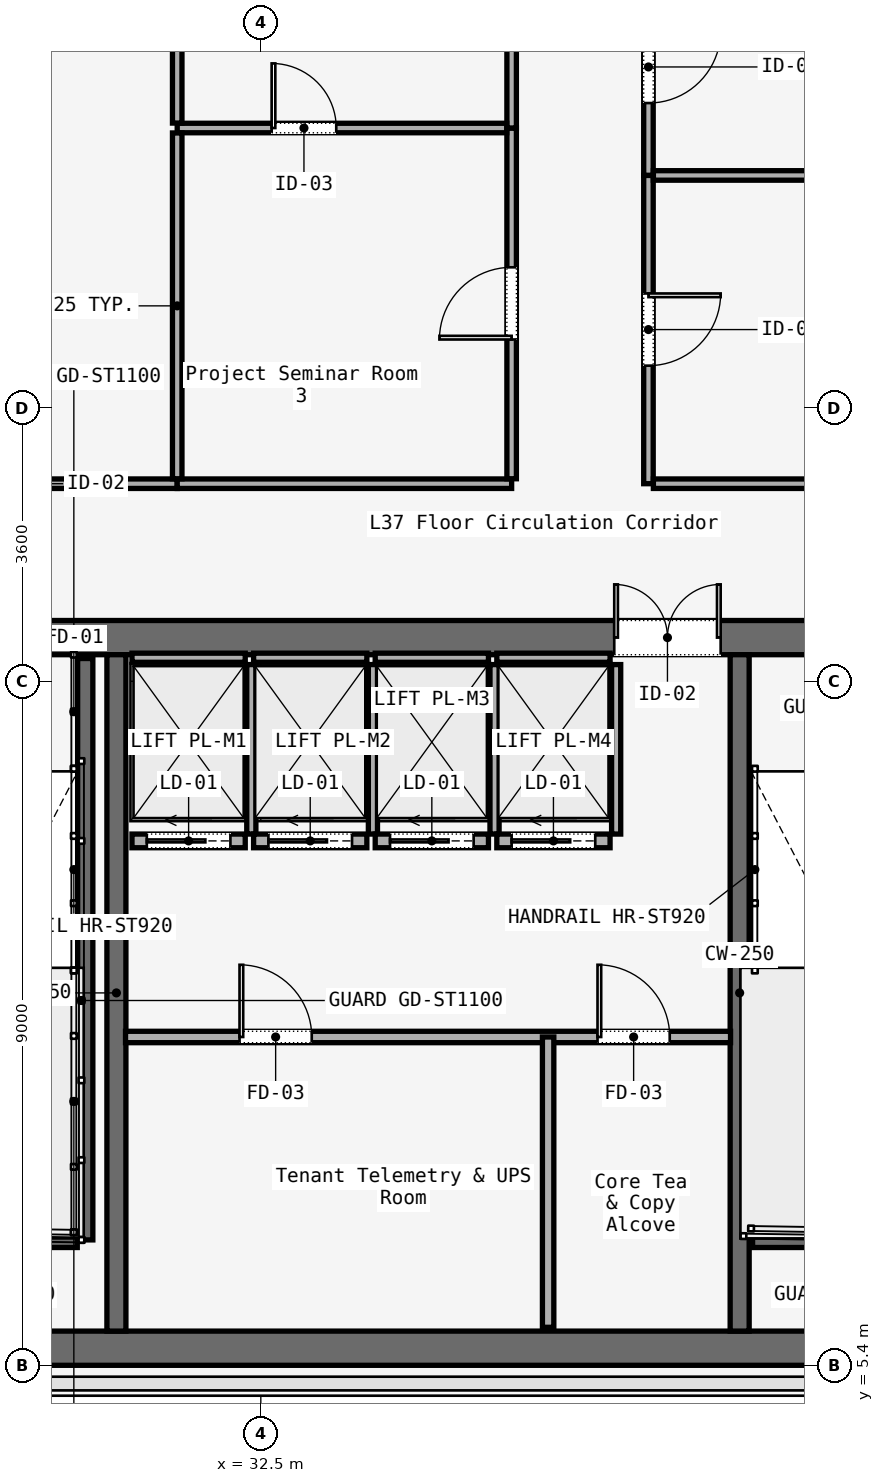
"""IFC4 building model, lengths in metres.
Left out: names, types, materials, properties, quantities, classifications, styles, units other than length and angle.
Written with IfcOpenShell. Run it as: python <this file> out.ifc"""

import sys

from ifc_helpers import new_model, si_unit, direction, frame, frame_2d, origin, place, context, subcontext, project, spatial, rectangle, extrude, element, fill, save


model = new_model("IFC4")
c1 = context("Model", 3, precision=1e-05, world=origin(), true_north=direction((0.0, 1.0)))
c2 = subcontext(c1, "Body", "Model", "MODEL_VIEW")
j1 = project(units=[si_unit("LENGTHUNIT", "METRE"), si_unit("PLANEANGLEUNIT", "RADIAN")], contexts=[c1])
p1 = place(None, origin())
s1 = spatial("IfcSite", under=j1, at=p1, CompositionType="ELEMENT")
p2 = place(p1, origin())
s2 = spatial("IfcBuilding", under=s1, at=p2, CompositionType="ELEMENT")
p3 = place(p2, frame((0.0, 0.0, 157.4)))
s3 = spatial("IfcBuildingStorey", under=s2, at=p3, CompositionType="ELEMENT", Elevation=157.4)
p4 = place(p3, frame((26.45, 14.975, 0.0), z_axis=(0.0, 0.0, 1.0), x_axis=(1.0, 0.0, 0.0)))
e1 = element("IfcWall", 1, at=p4, inside=s3, PredefinedType="SOLIDWALL", context=c2, shape_type="SweptSolid", body=[
    extrude(rectangle(XDim=31.1, YDim=0.45, at=frame_2d((15.55, 0.0))), origin(), (0.0, 0.0, 1.0), 3.58),
])
p5 = place(p4, frame((1.65, 0.0, 0.0)))
e2 = element("IfcOpeningElement", 2, at=p5, cuts=e1, PredefinedType="OPENING", context=c2, shape_type="SweptSolid", body=[
    extrude(rectangle(XDim=1.1, YDim=2.2, at=frame_2d((0.55, 1.1))), frame((0.0, 0.225, 0.0), z_axis=(0.0, -1.0, 0.0), x_axis=(1.0, 0.0, 0.0)), (0.0, 0.0, 1.0), 0.45),
])
p6 = place(p4, frame((13.65, 0.0, 0.0)))
e3 = element("IfcOpeningElement", 3, at=p6, cuts=e1, PredefinedType="OPENING", context=c2, shape_type="SweptSolid", body=[
    extrude(rectangle(XDim=1.1, YDim=2.2, at=frame_2d((0.55, 1.1))), frame((0.0, 0.225, 0.0), z_axis=(0.0, -1.0, 0.0), x_axis=(1.0, 0.0, 0.0)), (0.0, 0.0, 1.0), 0.45),
])
p7 = place(p4, frame((25.55, 0.0, 0.0)))
e4 = element("IfcOpeningElement", 4, at=p7, cuts=e1, PredefinedType="OPENING", context=c2, shape_type="SweptSolid", body=[
    extrude(rectangle(XDim=1.1, YDim=2.2, at=frame_2d((0.55, 1.1))), frame((0.0, 0.225, 0.0), z_axis=(0.0, -1.0, 0.0), x_axis=(1.0, 0.0, 0.0)), (0.0, 0.0, 1.0), 0.45),
])
p8 = place(p4, frame((10.7, 0.0, 0.0)))
e5 = element("IfcOpeningElement", 5, at=p8, cuts=e1, PredefinedType="OPENING", context=c2, shape_type="SweptSolid", body=[
    extrude(rectangle(XDim=1.4, YDim=2.2, at=frame_2d((0.7, 1.1))), frame((0.0, 0.225, 0.0), z_axis=(0.0, -1.0, 0.0), x_axis=(1.0, 0.0, 0.0)), (0.0, 0.0, 1.0), 0.45),
])
p9 = place(p4, frame((19.35, 0.0, 0.0)))
e6 = element("IfcOpeningElement", 6, at=p9, cuts=e1, PredefinedType="OPENING", context=c2, shape_type="SweptSolid", body=[
    extrude(rectangle(XDim=1.1, YDim=2.2, at=frame_2d((0.55, 1.1))), frame((0.0, 0.225, 0.0), z_axis=(0.0, -1.0, 0.0), x_axis=(1.0, 0.0, 0.0)), (0.0, 0.0, 1.0), 0.45),
])
p10 = place(p4, frame((21.4, 0.0, 0.0)))
e7 = element("IfcOpeningElement", 7, at=p10, cuts=e1, PredefinedType="OPENING", context=c2, shape_type="SweptSolid", body=[
    extrude(rectangle(XDim=0.9, YDim=2.1, at=frame_2d((0.45, 1.05))), frame((0.0, 0.225, 0.0), z_axis=(0.0, -1.0, 0.0), x_axis=(1.0, 0.0, 0.0)), (0.0, 0.0, 1.0), 0.45),
])
p11 = place(p4, frame((23.35, 0.0, 0.0)))
e8 = element("IfcOpeningElement", 8, at=p11, cuts=e1, PredefinedType="OPENING", context=c2, shape_type="SweptSolid", body=[
    extrude(rectangle(XDim=1.3, YDim=2.3, at=frame_2d((0.65, 1.15))), frame((0.0, 0.225, 0.0), z_axis=(0.0, -1.0, 0.0), x_axis=(1.0, 0.0, 0.0)), (0.0, 0.0, 1.0), 0.45),
])
p12 = place(p3, frame((26.45, 5.625, 0.0), z_axis=(0.0, 0.0, 1.0), x_axis=(1.0, 0.0, 0.0)))
e9 = element("IfcWall", 9, at=p12, inside=s3, PredefinedType="SOLIDWALL", context=c2, shape_type="SweptSolid", body=[
    extrude(rectangle(XDim=31.1, YDim=0.45, at=frame_2d((15.55, 0.0))), origin(), (0.0, 0.0, 1.0), 3.58),
])
for number, where, z_axis, x_axis in (
    (10, (30.6, 5.85, 0.0), (0.0, 0.0, 1.0), (0.0, 1.0, 0.0)),
    (11, (38.8, 5.85, 0.0), (0.0, 0.0, 1.0), (0.0, 1.0, 0.0)),
):
    element("IfcWall", number, at=place(p3, frame(where, z_axis=z_axis, x_axis=x_axis)), inside=s3, PredefinedType="SOLIDWALL", context=c2, shape_type="SweptSolid", body=[
        extrude(rectangle(XDim=8.9, YDim=0.25, at=frame_2d((4.45, 0.0))), origin(), (0.0, 0.0, 1.0), 3.58),
    ])
p13 = place(p3, frame((30.19, 14.7, 0.0), z_axis=(0.0, 0.0, 1.0), x_axis=(0.0, -1.0, 0.0)))
e12 = element("IfcWall", 12, at=p13, inside=s3, PredefinedType="SOLIDWALL", context=c2, shape_type="SweptSolid", body=[
    extrude(rectangle(XDim=7.65, YDim=0.2, at=frame_2d((3.825, 0.0))), origin(), (0.0, 0.0, 1.0), 3.8),
])
for number, where, z_axis, x_axis in (
    (13, (26.97, 7.05, 0.0), (0.0, 0.0, 1.0), (1.0, 0.0, 0.0)),
    (14, (38.97, 7.05, 0.0), (0.0, 0.0, 1.0), (1.0, 0.0, 0.0)),
):
    element("IfcWall", number, at=place(p3, frame(where, z_axis=z_axis, x_axis=x_axis)), inside=s3, PredefinedType="SOLIDWALL", context=c2, shape_type="SweptSolid", body=[
        extrude(rectangle(XDim=3.115, YDim=0.2, at=frame_2d((1.558, 0.0))), origin(), (0.0, 0.0, 1.0), 3.8),
    ])
p14 = place(p3, frame((30.72, 9.72, 0.0), z_axis=(0.0, 0.0, 1.0), x_axis=(1.0, 0.0, 0.0)))
e15 = element("IfcWall", 15, at=p14, inside=s3, PredefinedType="PARTITIONING", context=c2, shape_type="SweptSolid", body=[
    extrude(rectangle(XDim=7.96, YDim=0.15, at=frame_2d((3.98, 0.0))), origin(), (0.0, 0.0, 1.0), 3.01),
])
p15 = place(p14, frame((1.5, 0.0, 0.0)))
e16 = element("IfcOpeningElement", 16, at=p15, cuts=e15, PredefinedType="OPENING", context=c2, shape_type="SweptSolid", body=[
    extrude(rectangle(XDim=0.95, YDim=2.2, at=frame_2d((0.475, 1.1))), frame((0.0, 0.075, 0.0), z_axis=(0.0, -1.0, 0.0), x_axis=(1.0, 0.0, 0.0)), (0.0, 0.0, 1.0), 0.15),
])
p16 = place(p14, frame((6.21, 0.0, 0.0)))
e17 = element("IfcOpeningElement", 17, at=p16, cuts=e15, PredefinedType="OPENING", context=c2, shape_type="SweptSolid", body=[
    extrude(rectangle(XDim=0.95, YDim=2.2, at=frame_2d((0.475, 1.1))), frame((0.0, 0.075, 0.0), z_axis=(0.0, -1.0, 0.0), x_axis=(1.0, 0.0, 0.0)), (0.0, 0.0, 1.0), 0.15),
])
p17 = place(p3, frame((36.28, 5.9, 0.0), z_axis=(0.0, 0.0, 1.0), x_axis=(0.0, 1.0, 0.0)))
e18 = element("IfcWall", 18, at=p17, inside=s3, PredefinedType="PARTITIONING", context=c2, shape_type="SweptSolid", body=[
    extrude(rectangle(XDim=3.82, YDim=0.15, at=frame_2d((1.91, 0.0))), origin(), (0.0, 0.0, 1.0), 3.01),
])
p18 = place(p3, frame((30.805, 12.3, 0.0), z_axis=(0.0, 0.0, 1.0), x_axis=(1.0, 0.0, 0.0)))
e19 = element("IfcWall", 19, at=p18, inside=s3, PredefinedType="SOLIDWALL", context=c2, shape_type="SweptSolid", body=[
    extrude(rectangle(XDim=1.49, YDim=0.18, at=frame_2d((0.745, 0.0))), origin(), (0.0, 0.0, 1.0), 3.01),
])
p19 = place(p18, frame((0.195, 0.0, 0.0)))
e20 = element("IfcOpeningElement", 20, at=p19, cuts=e19, PredefinedType="OPENING", context=c2, shape_type="SweptSolid", body=[
    extrude(rectangle(XDim=1.1, YDim=2.2, at=frame_2d((0.55, 1.1))), frame((0.0, 0.09, 0.0), z_axis=(0.0, -1.0, 0.0), x_axis=(1.0, 0.0, 0.0)), (0.0, 0.0, 1.0), 0.18),
])
p20 = place(p3, frame((30.805, 14.71, 0.0), z_axis=(0.0, 0.0, 1.0), x_axis=(1.0, 0.0, 0.0)))
e21 = element("IfcWall", 21, at=p20, inside=s3, PredefinedType="SOLIDWALL", context=c2, shape_type="SweptSolid", body=[
    extrude(rectangle(XDim=1.49, YDim=0.12, at=frame_2d((0.745, 0.0))), origin(), (0.0, 0.0, 1.0), 3.01),
])
p21 = place(p3, frame((32.375, 12.39, 0.0), z_axis=(0.0, 0.0, 1.0), x_axis=(0.0, 1.0, 0.0)))
e22 = element("IfcWall", 22, at=p21, inside=s3, PredefinedType="SOLIDWALL", context=c2, shape_type="SweptSolid", body=[
    extrude(rectangle(XDim=2.23, YDim=0.12, at=frame_2d((1.115, 0.0))), origin(), (0.0, 0.0, 1.0), 3.01),
])
p22 = place(p3, frame((32.405, 12.3, 0.0), z_axis=(0.0, 0.0, 1.0), x_axis=(1.0, 0.0, 0.0)))
e23 = element("IfcWall", 23, at=p22, inside=s3, PredefinedType="SOLIDWALL", context=c2, shape_type="SweptSolid", body=[
    extrude(rectangle(XDim=1.49, YDim=0.18, at=frame_2d((0.745, 0.0))), origin(), (0.0, 0.0, 1.0), 3.01),
])
p23 = place(p22, frame((0.195, 0.0, 0.0)))
e24 = element("IfcOpeningElement", 24, at=p23, cuts=e23, PredefinedType="OPENING", context=c2, shape_type="SweptSolid", body=[
    extrude(rectangle(XDim=1.1, YDim=2.2, at=frame_2d((0.55, 1.1))), frame((0.0, 0.09, 0.0), z_axis=(0.0, -1.0, 0.0), x_axis=(1.0, 0.0, 0.0)), (0.0, 0.0, 1.0), 0.18),
])
p24 = place(p3, frame((32.405, 14.71, 0.0), z_axis=(0.0, 0.0, 1.0), x_axis=(1.0, 0.0, 0.0)))
e25 = element("IfcWall", 25, at=p24, inside=s3, PredefinedType="SOLIDWALL", context=c2, shape_type="SweptSolid", body=[
    extrude(rectangle(XDim=1.49, YDim=0.12, at=frame_2d((0.745, 0.0))), origin(), (0.0, 0.0, 1.0), 3.01),
])
p25 = place(p3, frame((33.975, 12.39, 0.0), z_axis=(0.0, 0.0, 1.0), x_axis=(0.0, 1.0, 0.0)))
e26 = element("IfcWall", 26, at=p25, inside=s3, PredefinedType="SOLIDWALL", context=c2, shape_type="SweptSolid", body=[
    extrude(rectangle(XDim=2.23, YDim=0.12, at=frame_2d((1.115, 0.0))), origin(), (0.0, 0.0, 1.0), 3.01),
])
p26 = place(p3, frame((34.005, 12.3, 0.0), z_axis=(0.0, 0.0, 1.0), x_axis=(1.0, 0.0, 0.0)))
e27 = element("IfcWall", 27, at=p26, inside=s3, PredefinedType="SOLIDWALL", context=c2, shape_type="SweptSolid", body=[
    extrude(rectangle(XDim=1.49, YDim=0.18, at=frame_2d((0.745, 0.0))), origin(), (0.0, 0.0, 1.0), 3.01),
])
p27 = place(p26, frame((0.195, 0.0, 0.0)))
e28 = element("IfcOpeningElement", 28, at=p27, cuts=e27, PredefinedType="OPENING", context=c2, shape_type="SweptSolid", body=[
    extrude(rectangle(XDim=1.1, YDim=2.2, at=frame_2d((0.55, 1.1))), frame((0.0, 0.09, 0.0), z_axis=(0.0, -1.0, 0.0), x_axis=(1.0, 0.0, 0.0)), (0.0, 0.0, 1.0), 0.18),
])
p28 = place(p3, frame((34.005, 14.71, 0.0), z_axis=(0.0, 0.0, 1.0), x_axis=(1.0, 0.0, 0.0)))
e29 = element("IfcWall", 29, at=p28, inside=s3, PredefinedType="SOLIDWALL", context=c2, shape_type="SweptSolid", body=[
    extrude(rectangle(XDim=1.49, YDim=0.12, at=frame_2d((0.745, 0.0))), origin(), (0.0, 0.0, 1.0), 3.01),
])
p29 = place(p3, frame((35.575, 12.39, 0.0), z_axis=(0.0, 0.0, 1.0), x_axis=(0.0, 1.0, 0.0)))
e30 = element("IfcWall", 30, at=p29, inside=s3, PredefinedType="SOLIDWALL", context=c2, shape_type="SweptSolid", body=[
    extrude(rectangle(XDim=2.23, YDim=0.12, at=frame_2d((1.115, 0.0))), origin(), (0.0, 0.0, 1.0), 3.01),
])
p30 = place(p3, frame((35.605, 12.3, 0.0), z_axis=(0.0, 0.0, 1.0), x_axis=(1.0, 0.0, 0.0)))
e31 = element("IfcWall", 31, at=p30, inside=s3, PredefinedType="SOLIDWALL", context=c2, shape_type="SweptSolid", body=[
    extrude(rectangle(XDim=1.49, YDim=0.18, at=frame_2d((0.745, 0.0))), origin(), (0.0, 0.0, 1.0), 3.01),
])
p31 = place(p30, frame((0.195, 0.0, 0.0)))
e32 = element("IfcOpeningElement", 32, at=p31, cuts=e31, PredefinedType="OPENING", context=c2, shape_type="SweptSolid", body=[
    extrude(rectangle(XDim=1.1, YDim=2.2, at=frame_2d((0.55, 1.1))), frame((0.0, 0.09, 0.0), z_axis=(0.0, -1.0, 0.0), x_axis=(1.0, 0.0, 0.0)), (0.0, 0.0, 1.0), 0.18),
])
p32 = place(p3, frame((35.605, 14.71, 0.0), z_axis=(0.0, 0.0, 1.0), x_axis=(1.0, 0.0, 0.0)))
e33 = element("IfcWall", 33, at=p32, inside=s3, PredefinedType="SOLIDWALL", context=c2, shape_type="SweptSolid", body=[
    extrude(rectangle(XDim=1.49, YDim=0.12, at=frame_2d((0.745, 0.0))), origin(), (0.0, 0.0, 1.0), 3.01),
])
p33 = place(p3, frame((37.175, 12.39, 0.0), z_axis=(0.0, 0.0, 1.0), x_axis=(0.0, 1.0, 0.0)))
e34 = element("IfcWall", 34, at=p33, inside=s3, PredefinedType="SOLIDWALL", context=c2, shape_type="SweptSolid", body=[
    extrude(rectangle(XDim=2.23, YDim=0.12, at=frame_2d((1.115, 0.0))), origin(), (0.0, 0.0, 1.0), 3.01),
])
p34 = place(p3, frame((25.665, 17.0, 0.0), z_axis=(0.0, 0.0, 1.0), x_axis=(1.0, 0.0, 0.0)))
e35 = element("IfcWall", 35, at=p34, inside=s3, PredefinedType="PARTITIONING", context=c2, shape_type="SweptSolid", body=[
    extrude(rectangle(XDim=5.735, YDim=0.125, at=frame_2d((2.867, 0.0))), origin(), (0.0, 0.0, 1.0), 3.01),
])
p35 = place(p34, frame((2.167, 0.0, 0.0)))
e36 = element("IfcOpeningElement", 36, at=p35, cuts=e35, PredefinedType="OPENING", context=c2, shape_type="SweptSolid", body=[
    extrude(rectangle(XDim=1.4, YDim=2.2, at=frame_2d((0.7, 1.1))), frame((0.0, 0.062, 0.0), z_axis=(0.0, -1.0, 0.0), x_axis=(1.0, 0.0, 0.0)), (0.0, 0.0, 1.0), 0.125),
])
p36 = place(p3, frame((31.4, 17.0, 0.0), z_axis=(0.0, 0.0, 1.0), x_axis=(1.0, 0.0, 0.0)))
e37 = element("IfcWall", 37, at=p36, inside=s3, PredefinedType="PARTITIONING", context=c2, shape_type="SweptSolid", body=[
    extrude(rectangle(XDim=4.4, YDim=0.125, at=frame_2d((2.2, 0.0))), origin(), (0.0, 0.0, 1.0), 3.01),
])
p37 = place(p3, frame((35.8, 17.065, 0.0), z_axis=(0.0, 0.0, 1.0), x_axis=(0.0, 1.0, 0.0)))
e38 = element("IfcWall", 38, at=p37, inside=s3, PredefinedType="PARTITIONING", context=c2, shape_type="SweptSolid", body=[
    extrude(rectangle(XDim=4.615, YDim=0.125, at=frame_2d((2.308, 0.0))), origin(), (0.0, 0.0, 1.0), 3.01),
])
p38 = place(p37, frame((1.833, 0.0, 0.0)))
e39 = element("IfcOpeningElement", 39, at=p38, cuts=e38, PredefinedType="OPENING", context=c2, shape_type="SweptSolid", body=[
    extrude(rectangle(XDim=0.95, YDim=2.2, at=frame_2d((0.475, 1.1))), frame((0.0, 0.062, 0.0), z_axis=(0.0, -1.0, 0.0), x_axis=(1.0, 0.0, 0.0)), (0.0, 0.0, 1.0), 0.125),
])
p39 = place(p3, frame((35.8, 21.68, 0.0), z_axis=(0.0, 0.0, 1.0), x_axis=(0.0, 1.0, 0.0)))
e40 = element("IfcWall", 40, at=p39, inside=s3, PredefinedType="PARTITIONING", context=c2, shape_type="SweptSolid", body=[
    extrude(rectangle(XDim=2.574, YDim=0.125, at=frame_2d((1.287, 0.0))), origin(), (0.0, 0.0, 1.0), 3.01),
])
p40 = place(p3, frame((37.6, 23.911, 0.0), z_axis=(0.0, 0.0, 1.0), x_axis=(0.0, -1.0, 0.0)))
e41 = element("IfcWall", 41, at=p40, inside=s3, PredefinedType="PARTITIONING", context=c2, shape_type="SweptSolid", body=[
    extrude(rectangle(XDim=2.855, YDim=0.125, at=frame_2d((1.427, 0.0))), origin(), (0.0, 0.0, 1.0), 3.01),
])
p41 = place(p40, frame((0.952, 0.0, 0.0)))
e42 = element("IfcOpeningElement", 42, at=p41, cuts=e41, PredefinedType="OPENING", context=c2, shape_type="SweptSolid", body=[
    extrude(rectangle(XDim=0.95, YDim=2.2, at=frame_2d((0.475, 1.1))), frame((0.0, 0.062, 0.0), z_axis=(0.0, -1.0, 0.0), x_axis=(1.0, 0.0, 0.0)), (0.0, 0.0, 1.0), 0.125),
])
p42 = place(p3, frame((37.6, 21.056, 0.0), z_axis=(0.0, 0.0, 1.0), x_axis=(0.0, -1.0, 0.0)))
e43 = element("IfcWall", 43, at=p42, inside=s3, PredefinedType="PARTITIONING", context=c2, shape_type="SweptSolid", body=[
    extrude(rectangle(XDim=4.056, YDim=0.125, at=frame_2d((2.028, 0.0))), origin(), (0.0, 0.0, 1.0), 3.01),
])
p43 = place(p42, frame((1.553, 0.0, 0.0)))
e44 = element("IfcOpeningElement", 44, at=p43, cuts=e43, PredefinedType="OPENING", context=c2, shape_type="SweptSolid", body=[
    extrude(rectangle(XDim=0.95, YDim=2.2, at=frame_2d((0.475, 1.1))), frame((0.0, 0.062, 0.0), z_axis=(0.0, -1.0, 0.0), x_axis=(1.0, 0.0, 0.0)), (0.0, 0.0, 1.0), 0.125),
])
p44 = place(p3, frame((37.665, 17.0, 0.0), z_axis=(0.0, 0.0, 1.0), x_axis=(1.0, 0.0, 0.0)))
e45 = element("IfcWall", 45, at=p44, inside=s3, PredefinedType="PARTITIONING", context=c2, shape_type="SweptSolid", body=[
    extrude(rectangle(XDim=3.445, YDim=0.125, at=frame_2d((1.723, 0.0))), origin(), (0.0, 0.0, 1.0), 3.01),
])
p45 = place(p3, frame((37.665, 21.056, 0.0), z_axis=(0.0, 0.0, 1.0), x_axis=(1.0, 0.0, 0.0)))
e46 = element("IfcWall", 46, at=p45, inside=s3, PredefinedType="PARTITIONING", context=c2, shape_type="SweptSolid", body=[
    extrude(rectangle(XDim=3.38, YDim=0.125, at=frame_2d((1.69, 0.0))), origin(), (0.0, 0.0, 1.0), 3.01),
])
p46 = place(p3, frame((31.4, 21.68, 0.0), z_axis=(0.0, 0.0, 1.0), x_axis=(1.0, 0.0, 0.0)))
e47 = element("IfcWall", 47, at=p46, inside=s3, PredefinedType="PARTITIONING", context=c2, shape_type="SweptSolid", body=[
    extrude(rectangle(XDim=4.335, YDim=0.125, at=frame_2d((2.167, 0.0))), origin(), (0.0, 0.0, 1.0), 3.01),
])
p47 = place(p46, frame((1.242, 0.0, 0.0)))
e48 = element("IfcOpeningElement", 48, at=p47, cuts=e47, PredefinedType="OPENING", context=c2, shape_type="SweptSolid", body=[
    extrude(rectangle(XDim=0.85, YDim=2.15, at=frame_2d((0.425, 1.075))), frame((0.0, 0.062, 0.0), z_axis=(0.0, -1.0, 0.0), x_axis=(1.0, 0.0, 0.0)), (0.0, 0.0, 1.0), 0.125),
])
p48 = place(p3, frame((31.4, 17.065, 0.0), z_axis=(0.0, 0.0, 1.0), x_axis=(0.0, 1.0, 0.0)))
e49 = element("IfcWall", 49, at=p48, inside=s3, PredefinedType="PARTITIONING", context=c2, shape_type="SweptSolid", body=[
    extrude(rectangle(XDim=4.55, YDim=0.125, at=frame_2d((2.275, 0.0))), origin(), (0.0, 0.0, 1.0), 3.01),
])
p49 = place(p3, frame((31.4, 24.254, 0.0), z_axis=(0.0, 0.0, 1.0), x_axis=(0.0, -1.0, 0.0)))
e50 = element("IfcWall", 50, at=p49, inside=s3, PredefinedType="PARTITIONING", context=c2, shape_type="SweptSolid", body=[
    extrude(rectangle(XDim=2.509, YDim=0.125, at=frame_2d((1.254, 0.0))), origin(), (0.0, 0.0, 1.0), 3.01),
])
p50 = place(p8, origin())
e51 = element("IfcDoor", 51, at=p50, inside=s3, OperationType="DOUBLE_DOOR_SINGLE_SWING", PredefinedType="DOOR", context=c2, shape_type="SweptSolid", body=[
    extrude(rectangle(XDim=1.4, YDim=2.2, at=frame_2d((0.7, 1.1))), frame((0.0, 0.025, 0.0), z_axis=(0.0, -1.0, 0.0), x_axis=(1.0, 0.0, 0.0)), (0.0, 0.0, 1.0), 0.05),
])
fill(e5, e51)
p51 = place(p15, origin())
e52 = element("IfcDoor", 52, at=p51, inside=s3, OperationType="SINGLE_SWING_LEFT", PredefinedType="DOOR", context=c2, shape_type="SweptSolid", body=[
    extrude(rectangle(XDim=0.95, YDim=2.2, at=frame_2d((0.475, 1.1))), frame((0.0, 0.025, 0.0), z_axis=(0.0, -1.0, 0.0), x_axis=(1.0, 0.0, 0.0)), (0.0, 0.0, 1.0), 0.05),
])
fill(e16, e52)
p52 = place(p16, origin())
e53 = element("IfcDoor", 53, at=p52, inside=s3, OperationType="SINGLE_SWING_RIGHT", PredefinedType="DOOR", context=c2, shape_type="SweptSolid", body=[
    extrude(rectangle(XDim=0.95, YDim=2.2, at=frame_2d((0.475, 1.1))), frame((0.0, 0.025, 0.0), z_axis=(0.0, -1.0, 0.0), x_axis=(1.0, 0.0, 0.0)), (0.0, 0.0, 1.0), 0.05),
])
fill(e17, e53)
p53 = place(p19, origin())
e54 = element("IfcDoor", 54, at=p53, inside=s3, OperationType="SLIDING_TO_LEFT", PredefinedType="DOOR", context=c2, shape_type="SweptSolid", body=[
    extrude(rectangle(XDim=1.1, YDim=2.2, at=frame_2d((0.55, 1.1))), frame((0.0, 0.025, 0.0), z_axis=(0.0, -1.0, 0.0), x_axis=(1.0, 0.0, 0.0)), (0.0, 0.0, 1.0), 0.05),
])
fill(e20, e54)
p54 = place(p23, origin())
e55 = element("IfcDoor", 55, at=p54, inside=s3, OperationType="SLIDING_TO_LEFT", PredefinedType="DOOR", context=c2, shape_type="SweptSolid", body=[
    extrude(rectangle(XDim=1.1, YDim=2.2, at=frame_2d((0.55, 1.1))), frame((0.0, 0.025, 0.0), z_axis=(0.0, -1.0, 0.0), x_axis=(1.0, 0.0, 0.0)), (0.0, 0.0, 1.0), 0.05),
])
fill(e24, e55)
p55 = place(p27, origin())
e56 = element("IfcDoor", 56, at=p55, inside=s3, OperationType="SLIDING_TO_LEFT", PredefinedType="DOOR", context=c2, shape_type="SweptSolid", body=[
    extrude(rectangle(XDim=1.1, YDim=2.2, at=frame_2d((0.55, 1.1))), frame((0.0, 0.025, 0.0), z_axis=(0.0, -1.0, 0.0), x_axis=(1.0, 0.0, 0.0)), (0.0, 0.0, 1.0), 0.05),
])
fill(e28, e56)
p56 = place(p31, origin())
e57 = element("IfcDoor", 57, at=p56, inside=s3, OperationType="SLIDING_TO_LEFT", PredefinedType="DOOR", context=c2, shape_type="SweptSolid", body=[
    extrude(rectangle(XDim=1.1, YDim=2.2, at=frame_2d((0.55, 1.1))), frame((0.0, 0.025, 0.0), z_axis=(0.0, -1.0, 0.0), x_axis=(1.0, 0.0, 0.0)), (0.0, 0.0, 1.0), 0.05),
])
fill(e32, e57)
p57 = place(p43, origin())
e58 = element("IfcDoor", 58, at=p57, inside=s3, OperationType="SINGLE_SWING_RIGHT", PredefinedType="DOOR", context=c2, shape_type="SweptSolid", body=[
    extrude(rectangle(XDim=0.95, YDim=2.2, at=frame_2d((0.475, 1.1))), frame((0.0, 0.025, 0.0), z_axis=(0.0, -1.0, 0.0), x_axis=(1.0, 0.0, 0.0)), (0.0, 0.0, 1.0), 0.05),
])
fill(e44, e58)
p58 = place(p38, origin())
e59 = element("IfcDoor", 59, at=p58, inside=s3, OperationType="SINGLE_SWING_RIGHT", PredefinedType="DOOR", context=c2, shape_type="SweptSolid", body=[
    extrude(rectangle(XDim=0.95, YDim=2.2, at=frame_2d((0.475, 1.1))), frame((0.0, 0.025, 0.0), z_axis=(0.0, -1.0, 0.0), x_axis=(1.0, 0.0, 0.0)), (0.0, 0.0, 1.0), 0.05),
])
fill(e39, e59)
p59 = place(p41, origin())
e60 = element("IfcDoor", 60, at=p59, inside=s3, OperationType="SINGLE_SWING_RIGHT", PredefinedType="DOOR", context=c2, shape_type="SweptSolid", body=[
    extrude(rectangle(XDim=0.95, YDim=2.2, at=frame_2d((0.475, 1.1))), frame((0.0, 0.025, 0.0), z_axis=(0.0, -1.0, 0.0), x_axis=(1.0, 0.0, 0.0)), (0.0, 0.0, 1.0), 0.05),
])
fill(e42, e60)
p60 = place(p47, origin())
e61 = element("IfcDoor", 61, at=p60, inside=s3, OperationType="SINGLE_SWING_LEFT", PredefinedType="DOOR", context=c2, shape_type="SweptSolid", body=[
    extrude(rectangle(XDim=0.85, YDim=2.15, at=frame_2d((0.425, 1.075))), frame((0.0, 0.025, 0.0), z_axis=(0.0, -1.0, 0.0), x_axis=(1.0, 0.0, 0.0)), (0.0, 0.0, 1.0), 0.05),
])
fill(e48, e61)
save(model, sys.argv[1])
